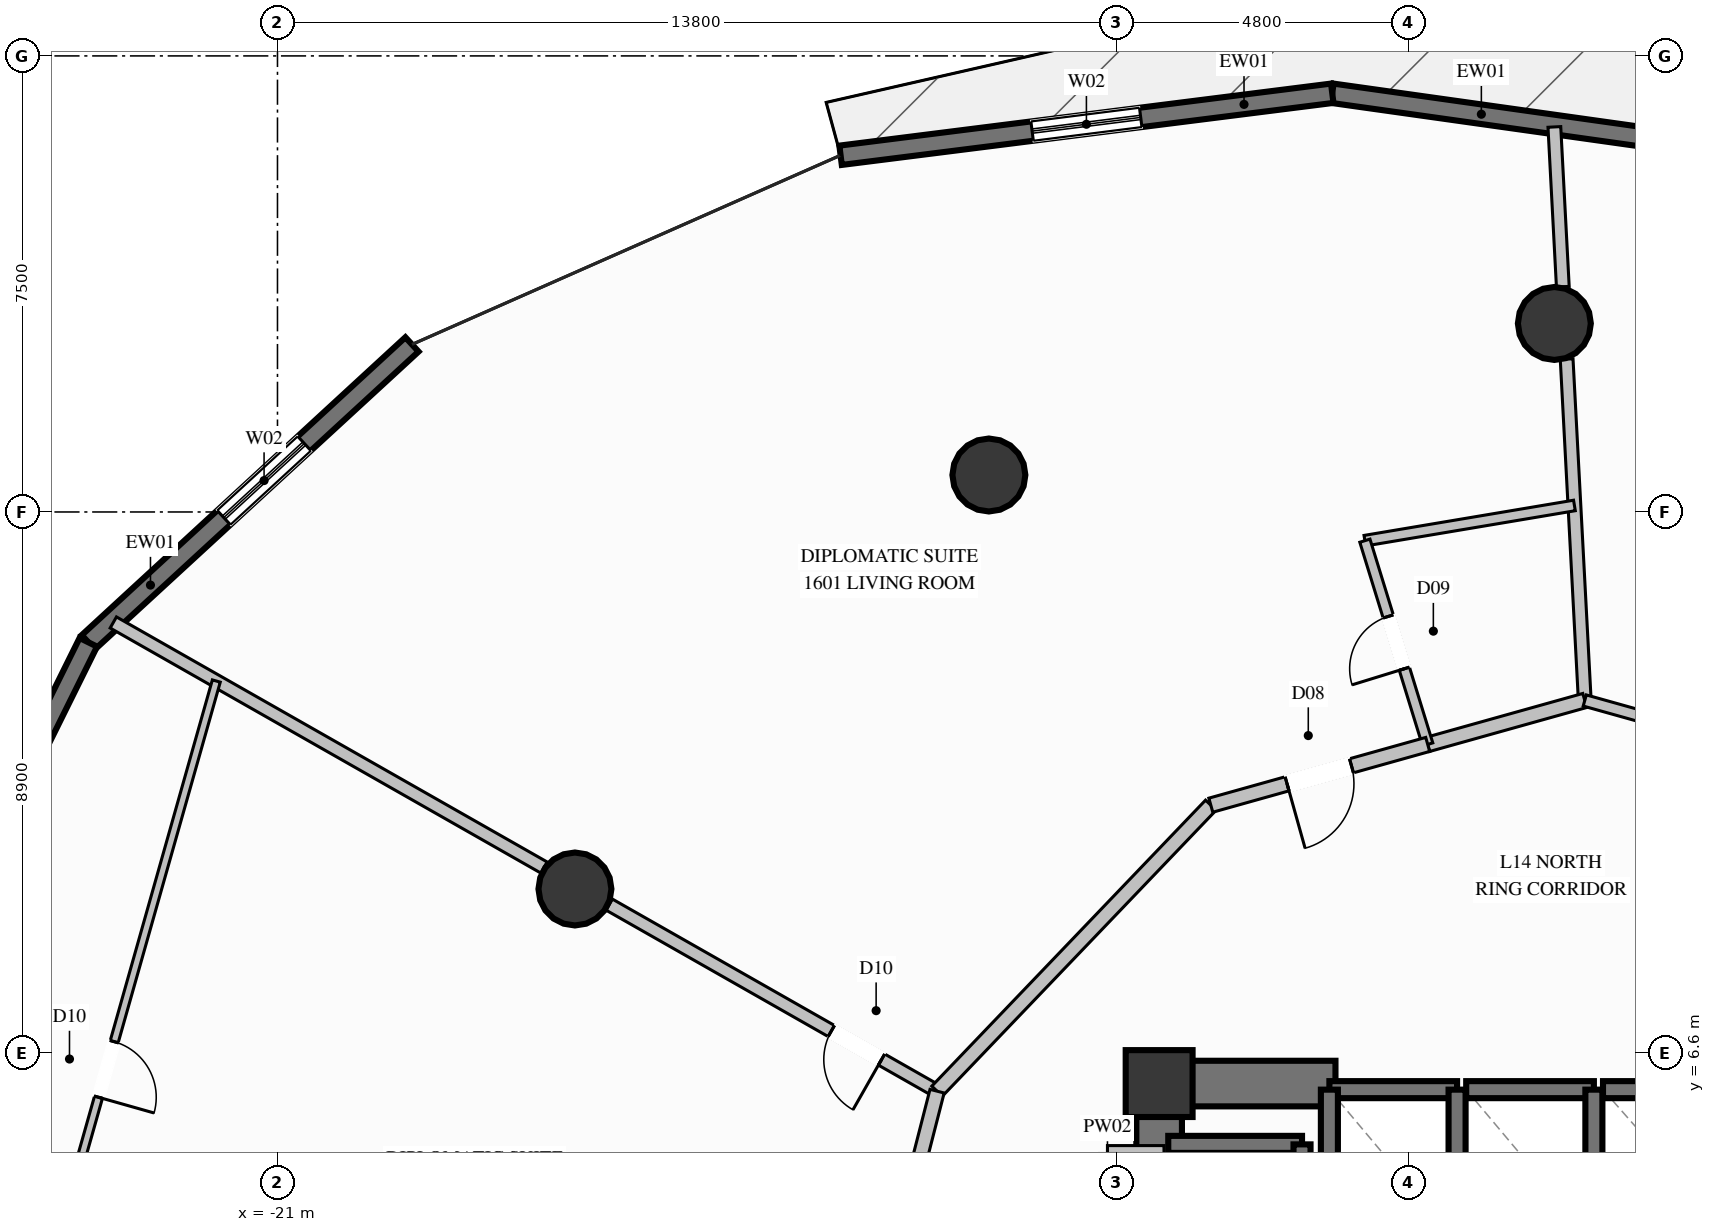
"""IFC4 building model, lengths in metres.
Left out: names, types, materials, properties, quantities, classifications, styles, units other than length and angle.
Written with IfcOpenShell. Run it as: python <this file> out.ifc"""

import sys

from ifc_helpers import new_model, si_unit, direction, frame, frame_2d, origin, origin_2d, place, context, subcontext, project, spatial, rectangle, circle, extrude, element, fill, save


model = new_model("IFC4")
c1 = context("Model", 3, precision=1e-05, world=origin(), true_north=direction((0.0, 1.0)))
c2 = subcontext(c1, "Body", "Model", "MODEL_VIEW")
j1 = project(units=[si_unit("LENGTHUNIT", "METRE"), si_unit("PLANEANGLEUNIT", "RADIAN")], contexts=[c1])
p1 = place(None, origin())
s1 = spatial("IfcSite", under=j1, at=p1, CompositionType="ELEMENT")
p2 = place(p1, origin())
s2 = spatial("IfcBuilding", under=s1, at=p2, CompositionType="ELEMENT")
p3 = place(p2, frame((0.0, 0.0, 60.8)))
s3 = spatial("IfcBuildingStorey", under=s2, at=p3, CompositionType="ELEMENT", Elevation=60.8)
p4 = place(p3, frame((-6.5, 6.1, 0.0), z_axis=(0.0, 0.0, 1.0), x_axis=(1.0, 0.0, 0.0)))
e1 = element("IfcColumn", 1, at=p4, inside=s3, PredefinedType="COLUMN", context=c2, shape_type="SweptSolid", body=[
    extrude(rectangle(XDim=1.1, YDim=1.1, at=origin_2d()), origin(), (0.0, 0.0, 1.0), 3.6),
])
p5 = place(p3, frame((-6.125, 6.1, 0.0), z_axis=(0.0, 0.0, 1.0), x_axis=(1.0, 0.0, 0.0)))
e2 = element("IfcWall", 2, at=p5, inside=s3, PredefinedType="SHEAR", context=c2, shape_type="SweptSolid", body=[
    extrude(rectangle(XDim=2.525, YDim=0.75, at=frame_2d((1.262, 0.0))), origin(), (0.0, 0.0, 1.0), 3.6),
])
p6 = place(p3, frame((-6.5, 2.35, 0.0), z_axis=(0.0, 0.0, 1.0), x_axis=(0.0, 1.0, 0.0)))
e3 = element("IfcWall", 3, at=p6, inside=s3, PredefinedType="SHEAR", context=c2, shape_type="SweptSolid", body=[
    extrude(rectangle(XDim=4.125, YDim=0.75, at=frame_2d((2.062, 0.0))), origin(), (0.0, 0.0, 1.0), 3.6),
])
for number, where, z_axis, x_axis in (
    (4, (0.0, 18.6, 0.0), (0.0, 0.0, 1.0), (1.0, 0.0, 0.0)),
    (5, (-9.3, 16.108, 0.0), (0.0, 0.0, 1.0), (1.0, 0.0, 0.0)),
    (6, (-16.108, 9.3, 0.0), (0.0, 0.0, 1.0), (1.0, 0.0, 0.0)),
):
    element("IfcColumn", number, at=place(p3, frame(where, z_axis=z_axis, x_axis=x_axis)), inside=s3, PredefinedType="COLUMN", context=c2, shape_type="SweptSolid", body=[
        extrude(circle(Radius=0.6, at=origin_2d()), origin(), (0.0, 0.0, 1.0), 3.6),
    ])
p7 = place(p3, frame((-3.653, 22.386, 0.0), z_axis=(0.0, 0.0, 1.0), x_axis=(0.990249073368, -0.139308193205, 0.0)))
e7 = element("IfcWall", 7, at=p7, inside=s3, PredefinedType="SOLIDWALL", context=c2, shape_type="SweptSolid", body=[
    extrude(rectangle(XDim=8.412, YDim=0.32, at=frame_2d((4.206, 0.0))), origin(), (0.0, 0.0, 1.0), 3.34),
])
p8 = place(p7, frame((5.203, 0.0, 0.35)))
e8 = element("IfcOpeningElement", 8, at=p8, cuts=e7, PredefinedType="OPENING", context=c2, shape_type="SweptSolid", body=[
    extrude(rectangle(XDim=1.8, YDim=2.6, at=frame_2d((0.9, 1.3))), frame((0.0, 0.17, 0.0), z_axis=(0.0, -1.0, 0.0), x_axis=(1.0, 0.0, 0.0)), (0.0, 0.0, 1.0), 0.34),
])
p9 = place(p3, frame((-11.739, 21.366, 0.0), z_axis=(0.0, 0.0, 1.0), x_axis=(0.992137142599, 0.125155464426, 0.0)))
e9 = element("IfcWall", 9, at=p9, inside=s3, PredefinedType="SOLIDWALL", context=c2, shape_type="SweptSolid", body=[
    extrude(rectangle(XDim=8.15, YDim=0.32, at=frame_2d((4.075, 0.0))), origin(), (0.0, 0.0, 1.0), 3.34),
])
p10 = place(p9, frame((3.175, 0.0, 0.35)))
e10 = element("IfcOpeningElement", 10, at=p10, cuts=e9, PredefinedType="OPENING", context=c2, shape_type="SweptSolid", body=[
    extrude(rectangle(XDim=1.8, YDim=2.6, at=frame_2d((0.9, 1.3))), frame((0.0, 0.17, 0.0), z_axis=(0.0, -1.0, 0.0), x_axis=(1.0, 0.0, 0.0)), (0.0, 0.0, 1.0), 0.34),
])
p11 = place(p3, frame((-24.111, 13.357, 0.0), z_axis=(0.0, 0.0, 1.0), x_axis=(0.735876522022, 0.677115754016, 0.0)))
e11 = element("IfcWall", 11, at=p11, inside=s3, PredefinedType="SOLIDWALL", context=c2, shape_type="SweptSolid", body=[
    extrude(rectangle(XDim=7.234, YDim=0.32, at=frame_2d((3.617, 0.0))), origin(), (0.0, 0.0, 1.0), 3.34),
])
p12 = place(p11, frame((3.028, 0.0, 0.35)))
e12 = element("IfcOpeningElement", 12, at=p12, cuts=e11, PredefinedType="OPENING", context=c2, shape_type="SweptSolid", body=[
    extrude(rectangle(XDim=1.8, YDim=2.6, at=frame_2d((0.9, 1.3))), frame((0.0, 0.17, 0.0), z_axis=(0.0, -1.0, 0.0), x_axis=(1.0, 0.0, 0.0)), (0.0, 0.0, 1.0), 0.34),
])
p13 = place(p3, frame((-27.186, 7.152, 0.0), z_axis=(0.0, 0.0, 1.0), x_axis=(0.444037823644, 0.896008041914, 0.0)))
e13 = element("IfcWall", 13, at=p13, inside=s3, PredefinedType="SOLIDWALL", context=c2, shape_type="SweptSolid", body=[
    extrude(rectangle(XDim=6.925, YDim=0.32, at=frame_2d((3.462, 0.0))), origin(), (0.0, 0.0, 1.0), 3.34),
])
p14 = place(p13, frame((2.682, 0.0, 0.35)))
e14 = element("IfcOpeningElement", 14, at=p14, cuts=e13, PredefinedType="OPENING", context=c2, shape_type="SweptSolid", body=[
    extrude(rectangle(XDim=1.8, YDim=2.6, at=frame_2d((0.9, 1.3))), frame((0.0, 0.17, 0.0), z_axis=(0.0, -1.0, 0.0), x_axis=(1.0, 0.0, 0.0)), (0.0, 0.0, 1.0), 0.34),
])
p15 = place(p3, frame((-1.6, 6.0, 0.0), z_axis=(0.0, 0.0, 1.0), x_axis=(-1.0, 0.0, 0.0)))
e15 = element("IfcWall", 15, at=p15, inside=s3, PredefinedType="SOLIDWALL", context=c2, shape_type="SweptSolid", body=[
    extrude(rectangle(XDim=2.1, YDim=0.28, at=frame_2d((1.05, 0.0))), origin(), (0.0, 0.0, 1.0), 3.34),
])
for number, where, z_axis, x_axis in (
    (16, (-3.7, 6.0, 0.0), (0.0, 0.0, 1.0), (0.0, -1.0, 0.0)),
    (17, (-1.6, 3.5, 0.0), (0.0, 0.0, 1.0), (0.0, 1.0, 0.0)),
):
    element("IfcWall", number, at=place(p3, frame(where, z_axis=z_axis, x_axis=x_axis)), inside=s3, PredefinedType="SOLIDWALL", context=c2, shape_type="SweptSolid", body=[
        extrude(rectangle(XDim=2.5, YDim=0.28, at=frame_2d((1.25, 0.0))), origin(), (0.0, 0.0, 1.0), 3.34),
    ])
p16 = place(p3, frame((0.65, 6.0, 0.0), z_axis=(0.0, 0.0, 1.0), x_axis=(-1.0, 0.0, 0.0)))
e18 = element("IfcWall", 18, at=p16, inside=s3, PredefinedType="SOLIDWALL", context=c2, shape_type="SweptSolid", body=[
    extrude(rectangle(XDim=2.1, YDim=0.28, at=frame_2d((1.05, 0.0))), origin(), (0.0, 0.0, 1.0), 3.34),
])
p17 = place(p3, frame((0.65, 3.5, 0.0), z_axis=(0.0, 0.0, 1.0), x_axis=(0.0, 1.0, 0.0)))
e19 = element("IfcWall", 19, at=p17, inside=s3, PredefinedType="SOLIDWALL", context=c2, shape_type="SweptSolid", body=[
    extrude(rectangle(XDim=2.5, YDim=0.28, at=frame_2d((1.25, 0.0))), origin(), (0.0, 0.0, 1.0), 3.34),
])
p18 = place(p3, frame((3.0, 6.0, 0.0), z_axis=(0.0, 0.0, 1.0), x_axis=(-1.0, 0.0, 0.0)))
e20 = element("IfcWall", 20, at=p18, inside=s3, PredefinedType="SOLIDWALL", context=c2, shape_type="SweptSolid", body=[
    extrude(rectangle(XDim=2.2, YDim=0.28, at=frame_2d((1.1, 0.0))), origin(), (0.0, 0.0, 1.0), 3.34),
])
p19 = place(p3, frame((-4.15, 5.1, 0.0), z_axis=(0.0, 0.0, 1.0), x_axis=(-1.0, 0.0, 0.0)))
e21 = element("IfcWall", 21, at=p19, inside=s3, PredefinedType="SOLIDWALL", context=c2, shape_type="SweptSolid", body=[
    extrude(rectangle(XDim=2.2, YDim=0.28, at=frame_2d((1.1, 0.0))), origin(), (0.0, 0.0, 1.0), 3.34),
])
p20 = place(p3, frame((-4.15, 2.4, 0.0), z_axis=(0.0, 0.0, 1.0), x_axis=(0.0, 1.0, 0.0)))
e22 = element("IfcWall", 22, at=p20, inside=s3, PredefinedType="SOLIDWALL", context=c2, shape_type="SweptSolid", body=[
    extrude(rectangle(XDim=2.7, YDim=0.28, at=frame_2d((1.35, 0.0))), origin(), (0.0, 0.0, 1.0), 3.34),
])
p21 = place(p3, frame((-7.35, 4.95, 0.0), z_axis=(0.0, 0.0, 1.0), x_axis=(1.0, 0.0, 0.0)))
e23 = element("IfcWall", 23, at=p21, inside=s3, PredefinedType="PARTITIONING", context=c2, shape_type="SweptSolid", body=[
    extrude(rectangle(XDim=0.93, YDim=0.26, at=frame_2d((0.465, 0.0))), origin(), (0.0, 0.0, 1.0), 3.34),
])
p22 = place(p3, frame((0.5, 12.4, 0.0), z_axis=(0.0, 0.0, 1.0), x_axis=(-0.053023803289, 0.998593248668, 0.0)))
e24 = element("IfcWall", 24, at=p22, inside=s3, PredefinedType="PARTITIONING", context=c2, shape_type="SweptSolid", body=[
    extrude(rectangle(XDim=5.622, YDim=0.21, at=frame_2d((2.811, 0.0))), origin(), (0.0, 0.0, 1.0), 2.709),
])
p23 = place(p3, frame((0.139, 19.204, 0.0), z_axis=(0.0, 0.0, 1.0), x_axis=(-0.05278768825, 0.998605758029, 0.0)))
e25 = element("IfcWall", 25, at=p23, inside=s3, PredefinedType="PARTITIONING", context=c2, shape_type="SweptSolid", body=[
    extrude(rectangle(XDim=2.632, YDim=0.21, at=frame_2d((1.316, 0.0))), origin(), (0.0, 0.0, 1.0), 3.34),
])
p24 = place(p3, frame((-10.152, 5.975, 0.0), z_axis=(0.0, 0.0, 1.0), x_axis=(-0.869157123992, 0.494536038944, 0.0)))
e26 = element("IfcWall", 26, at=p24, inside=s3, PredefinedType="PARTITIONING", context=c2, shape_type="SweptSolid", body=[
    extrude(rectangle(XDim=6.204, YDim=0.21, at=frame_2d((3.102, 0.0))), origin(), (0.0, 0.0, 1.0), 2.709),
])
p25 = place(p24, frame((1.051, 0.0, 0.0)))
e27 = element("IfcOpeningElement", 27, at=p25, cuts=e26, PredefinedType="OPENING", context=c2, shape_type="SweptSolid", body=[
    extrude(rectangle(XDim=0.95, YDim=2.1, at=frame_2d((0.475, 1.05))), frame((0.0, 0.115, 0.0), z_axis=(0.0, -1.0, 0.0), x_axis=(1.0, 0.0, 0.0)), (0.0, 0.0, 1.0), 0.23),
])
p26 = place(p3, frame((-16.617, 9.653, 0.0), z_axis=(0.0, 0.0, 1.0), x_axis=(-0.869161611856, 0.494528151348, 0.0)))
e28 = element("IfcWall", 28, at=p26, inside=s3, PredefinedType="PARTITIONING", context=c2, shape_type="SweptSolid", body=[
    extrude(rectangle(XDim=8.149, YDim=0.21, at=frame_2d((4.075, 0.0))), origin(), (0.0, 0.0, 1.0), 3.34),
])
p27 = place(p3, frame((0.5, 12.4, 0.0), z_axis=(0.0, 0.0, 1.0), x_axis=(-0.962997098558, -0.269511758869, 0.0)))
e29 = element("IfcWall", 29, at=p27, inside=s3, PredefinedType="PARTITIONING", context=c2, shape_type="SweptSolid", body=[
    extrude(rectangle(XDim=2.682, YDim=0.24, at=frame_2d((1.341, 0.0))), origin(), (0.0, 0.0, 1.0), 3.34),
])
p28 = place(p3, frame((0.33, 15.607, 0.0), z_axis=(0.0, 0.0, 1.0), x_axis=(-0.986183518822, -0.165656473477, 0.0)))
e30 = element("IfcWall", 30, at=p28, inside=s3, PredefinedType="PLUMBINGWALL", context=c2, shape_type="SweptSolid", body=[
    extrude(rectangle(XDim=3.494, YDim=0.175, at=frame_2d((1.747, 0.0))), origin(), (0.0, 0.0, 1.0), 3.34),
])
p29 = place(p3, frame((-2.083, 11.677, 0.0), z_axis=(0.0, 0.0, 1.0), x_axis=(-0.294570153527, 0.955629857555, 0.0)))
e31 = element("IfcWall", 31, at=p29, inside=s3, PredefinedType="PLUMBINGWALL", context=c2, shape_type="SweptSolid", body=[
    extrude(rectangle(XDim=3.507, YDim=0.175, at=frame_2d((1.753, 0.0))), origin(), (0.0, 0.0, 1.0), 3.34),
])
p30 = place(p29, frame((1.303, 0.0, 0.0)))
e32 = element("IfcOpeningElement", 32, at=p30, cuts=e31, PredefinedType="OPENING", context=c2, shape_type="SweptSolid", body=[
    extrude(rectangle(XDim=0.9, YDim=2.1, at=frame_2d((0.45, 1.05))), frame((0.0, 0.098, 0.0), z_axis=(0.0, -1.0, 0.0), x_axis=(1.0, 0.0, 0.0)), (0.0, 0.0, 1.0), 0.195),
])
p31 = place(p3, frame((-5.65, 10.678, 0.0), z_axis=(0.0, 0.0, 1.0), x_axis=(-0.691526541012, -0.72235105252, 0.0)))
e33 = element("IfcWall", 33, at=p31, inside=s3, PredefinedType="PARTITIONING", context=c2, shape_type="SweptSolid", body=[
    extrude(rectangle(XDim=6.51, YDim=0.24, at=frame_2d((3.255, 0.0))), origin(), (0.0, 0.0, 1.0), 3.34),
])
p32 = place(p3, frame((-2.083, 11.677, 0.0), z_axis=(0.0, 0.0, 1.0), x_axis=(-0.962943481199, -0.269703266603, 0.0)))
e34 = element("IfcWall", 34, at=p32, inside=s3, PredefinedType="PARTITIONING", context=c2, shape_type="SweptSolid", body=[
    extrude(rectangle(XDim=3.704, YDim=0.24, at=frame_2d((1.852, 0.0))), origin(), (0.0, 0.0, 1.0), 3.34),
])
p33 = place(p32, frame((1.302, 0.0, 0.0)))
e35 = element("IfcOpeningElement", 35, at=p33, cuts=e34, PredefinedType="OPENING", context=c2, shape_type="SweptSolid", body=[
    extrude(rectangle(XDim=1.1, YDim=2.3, at=frame_2d((0.55, 1.15))), frame((0.0, 0.13, 0.0), z_axis=(0.0, -1.0, 0.0), x_axis=(1.0, 0.0, 0.0)), (0.0, 0.0, 1.0), 0.26),
])
p34 = place(p3, frame((-10.152, 5.975, 0.0), z_axis=(0.0, 0.0, 1.0), x_axis=(-0.248446193127, -0.968645698447, 0.0)))
e36 = element("IfcWall", 36, at=p34, inside=s3, PredefinedType="PARTITIONING", context=c2, shape_type="SweptSolid", body=[
    extrude(rectangle(XDim=6.633, YDim=0.24, at=frame_2d((3.316, 0.0))), origin(), (0.0, 0.0, 1.0), 3.34),
])
p35 = place(p3, frame((-22.006, 12.72, 0.0), z_axis=(0.0, 0.0, 1.0), x_axis=(-0.272401157448, -0.962183771127, 0.0)))
e37 = element("IfcWall", 37, at=p35, inside=s3, PredefinedType="PARTITIONING", context=c2, shape_type="SweptSolid", body=[
    extrude(rectangle(XDim=13.278, YDim=0.135, at=frame_2d((6.639, 0.0))), origin(), (0.0, 0.0, 1.0), 3.34),
])
p36 = place(p35, frame((6.164, 0.0, 0.0)))
e38 = element("IfcOpeningElement", 38, at=p36, cuts=e37, PredefinedType="OPENING", context=c2, shape_type="SweptSolid", body=[
    extrude(rectangle(XDim=0.95, YDim=2.1, at=frame_2d((0.475, 1.05))), frame((0.0, 0.078, 0.0), z_axis=(0.0, -1.0, 0.0), x_axis=(1.0, 0.0, 0.0)), (0.0, 0.0, 1.0), 0.155),
])
p37 = place(p3, frame((6.65, 10.678, 0.0), z_axis=(0.0, 0.0, 1.0), x_axis=(-0.962966004827, 0.26962283573, 0.0)))
e39 = element("IfcWall", 39, at=p37, inside=s3, PredefinedType="PARTITIONING", context=c2, shape_type="SweptSolid", body=[
    extrude(rectangle(XDim=6.386, YDim=0.19, at=frame_2d((3.193, 0.0))), origin(), (0.0, 0.0, 1.0), 3.34),
])
p38 = place(p37, frame((2.718, 0.0, 0.0)))
e40 = element("IfcOpeningElement", 40, at=p38, cuts=e39, PredefinedType="OPENING", context=c2, shape_type="SweptSolid", body=[
    extrude(rectangle(XDim=0.95, YDim=2.1, at=frame_2d((0.475, 1.05))), frame((0.0, 0.105, 0.0), z_axis=(0.0, -1.0, 0.0), x_axis=(1.0, 0.0, 0.0)), (0.0, 0.0, 1.0), 0.21),
])
p39 = place(p10, origin())
e41 = element("IfcWindow", 41, at=p39, inside=s3, PartitioningType="SINGLE_PANEL", PredefinedType="WINDOW", context=c2, shape_type="SweptSolid", body=[
    extrude(rectangle(XDim=1.8, YDim=2.6, at=frame_2d((0.9, 1.3))), frame((0.0, 0.03, 0.0), z_axis=(0.0, -1.0, 0.0), x_axis=(1.0, 0.0, 0.0)), (0.0, 0.0, 1.0), 0.06),
])
fill(e10, e41)
p40 = place(p12, origin())
e42 = element("IfcWindow", 42, at=p40, inside=s3, PartitioningType="SINGLE_PANEL", PredefinedType="WINDOW", context=c2, shape_type="SweptSolid", body=[
    extrude(rectangle(XDim=1.8, YDim=2.6, at=frame_2d((0.9, 1.3))), frame((0.0, 0.03, 0.0), z_axis=(0.0, -1.0, 0.0), x_axis=(1.0, 0.0, 0.0)), (0.0, 0.0, 1.0), 0.06),
])
fill(e12, e42)
p41 = place(p30, origin())
e43 = element("IfcDoor", 43, at=p41, inside=s3, OperationType="SINGLE_SWING_LEFT", PredefinedType="DOOR", context=c2, shape_type="SweptSolid", body=[
    extrude(rectangle(XDim=0.9, YDim=2.1, at=frame_2d((0.45, 1.05))), frame((0.0, 0.025, 0.0), z_axis=(0.0, -1.0, 0.0), x_axis=(1.0, 0.0, 0.0)), (0.0, 0.0, 1.0), 0.05),
])
fill(e32, e43)
p42 = place(p33, origin())
e44 = element("IfcDoor", 44, at=p42, inside=s3, OperationType="SINGLE_SWING_RIGHT", PredefinedType="DOOR", context=c2, shape_type="SweptSolid", body=[
    extrude(rectangle(XDim=1.1, YDim=2.3, at=frame_2d((0.55, 1.15))), frame((0.0, 0.025, 0.0), z_axis=(0.0, -1.0, 0.0), x_axis=(1.0, 0.0, 0.0)), (0.0, 0.0, 1.0), 0.05),
])
fill(e35, e44)
p43 = place(p25, origin())
e45 = element("IfcDoor", 45, at=p43, inside=s3, OperationType="SINGLE_SWING_LEFT", PredefinedType="DOOR", context=c2, shape_type="SweptSolid", body=[
    extrude(rectangle(XDim=0.95, YDim=2.1, at=frame_2d((0.475, 1.05))), frame((0.0, 0.025, 0.0), z_axis=(0.0, -1.0, 0.0), x_axis=(1.0, 0.0, 0.0)), (0.0, 0.0, 1.0), 0.05),
])
fill(e27, e45)
p44 = place(p36, origin())
e46 = element("IfcDoor", 46, at=p44, inside=s3, OperationType="SINGLE_SWING_RIGHT", PredefinedType="DOOR", context=c2, shape_type="SweptSolid", body=[
    extrude(rectangle(XDim=0.95, YDim=2.1, at=frame_2d((0.475, 1.05))), frame((0.0, 0.025, 0.0), z_axis=(0.0, -1.0, 0.0), x_axis=(1.0, 0.0, 0.0)), (0.0, 0.0, 1.0), 0.05),
])
fill(e38, e46)
save(model, sys.argv[1])
